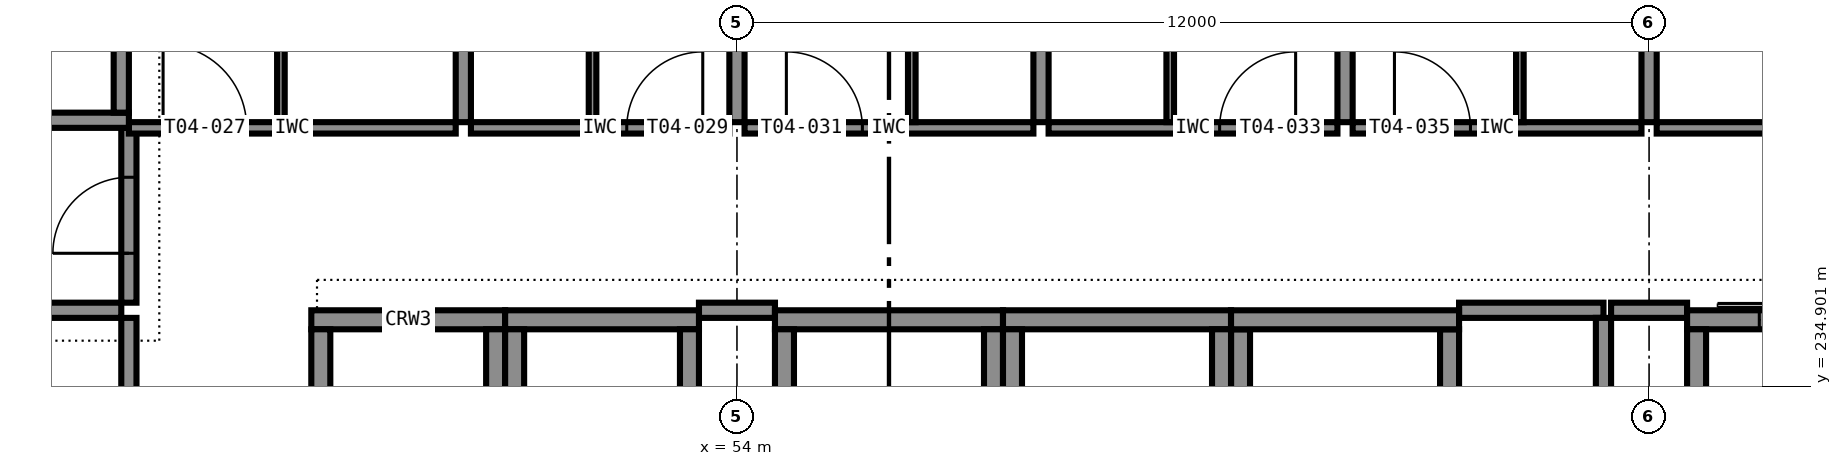
"""IFC4 building model, lengths in metres.
Left out: names, types, materials, properties, quantities, classifications, styles, units other than length and angle.
Written with IfcOpenShell. Run it as: python <this file> out.ifc"""

import sys

from ifc_helpers import new_model, si_unit, direction, frame, frame_2d, origin, place, context, subcontext, project, spatial, rectangle, extrude, element, fill, save


model = new_model("IFC4")
c1 = context("Model", 3, precision=1e-05, world=origin(), true_north=direction((0.0, 1.0)))
c2 = subcontext(c1, "Body", "Model", "MODEL_VIEW")
j1 = project(units=[si_unit("LENGTHUNIT", "METRE"), si_unit("PLANEANGLEUNIT", "RADIAN")], contexts=[c1])
p1 = place(None, origin())
s1 = spatial("IfcSite", under=j1, at=p1, CompositionType="ELEMENT")
p2 = place(p1, origin())
s2 = spatial("IfcBuilding", under=s1, at=p2, CompositionType="ELEMENT")
p3 = place(p2, frame((0.0, 0.0, 21.0)))
s3 = spatial("IfcBuildingStorey", under=s2, at=p3, CompositionType="ELEMENT", Elevation=21.0)
p4 = place(p3, frame((54.5, 235.775, 0.0), z_axis=(0.0, 0.0, 1.0), x_axis=(1.0, 0.0, 0.0)))
e1 = element("IfcWall", 1, at=p4, inside=s3, PredefinedType="SHEAR", context=c2, shape_type="SweptSolid", body=[
    extrude(rectangle(XDim=3.0, YDim=0.25, at=frame_2d((1.5, 0.0))), origin(), (0.0, 0.0, 1.0), 3.6),
])
for number, where, z_axis, x_axis in (
    (2, (54.625, 232.35, 0.0), (0.0, 0.0, 1.0), (0.0, 1.0, 0.0)),
    (3, (57.375, 232.35, 0.0), (0.0, 0.0, 1.0), (0.0, 1.0, 0.0)),
):
    element("IfcWall", number, at=place(p3, frame(where, z_axis=z_axis, x_axis=x_axis)), inside=s3, PredefinedType="SHEAR", context=c2, shape_type="SweptSolid", body=[
        extrude(rectangle(XDim=3.3, YDim=0.25, at=frame_2d((1.65, 0.0))), origin(), (0.0, 0.0, 1.0), 3.6),
    ])
p5 = place(p3, frame((57.5, 235.775, 0.0), z_axis=(0.0, 0.0, 1.0), x_axis=(1.0, 0.0, 0.0)))
e4 = element("IfcWall", 4, at=p5, inside=s3, PredefinedType="SHEAR", context=c2, shape_type="SweptSolid", body=[
    extrude(rectangle(XDim=3.0, YDim=0.25, at=frame_2d((1.5, 0.0))), origin(), (0.0, 0.0, 1.0), 3.6),
])
for number, where, z_axis, x_axis in (
    (5, (57.625, 232.35, 0.0), (0.0, 0.0, 1.0), (0.0, 1.0, 0.0)),
    (6, (60.375, 232.35, 0.0), (0.0, 0.0, 1.0), (0.0, 1.0, 0.0)),
):
    element("IfcWall", number, at=place(p3, frame(where, z_axis=z_axis, x_axis=x_axis)), inside=s3, PredefinedType="SHEAR", context=c2, shape_type="SweptSolid", body=[
        extrude(rectangle(XDim=3.3, YDim=0.25, at=frame_2d((1.65, 0.0))), origin(), (0.0, 0.0, 1.0), 3.6),
    ])
p6 = place(p3, frame((60.5, 235.775, 0.0), z_axis=(0.0, 0.0, 1.0), x_axis=(1.0, 0.0, 0.0)))
e7 = element("IfcWall", 7, at=p6, inside=s3, PredefinedType="SHEAR", context=c2, shape_type="SweptSolid", body=[
    extrude(rectangle(XDim=3.0, YDim=0.25, at=frame_2d((1.5, 0.0))), origin(), (0.0, 0.0, 1.0), 3.6),
])
for number, where, z_axis, x_axis in (
    (8, (60.625, 232.35, 0.0), (0.0, 0.0, 1.0), (0.0, 1.0, 0.0)),
    (9, (63.375, 232.35, 0.0), (0.0, 0.0, 1.0), (0.0, 1.0, 0.0)),
):
    element("IfcWall", number, at=place(p3, frame(where, z_axis=z_axis, x_axis=x_axis)), inside=s3, PredefinedType="SHEAR", context=c2, shape_type="SweptSolid", body=[
        extrude(rectangle(XDim=3.3, YDim=0.25, at=frame_2d((1.65, 0.0))), origin(), (0.0, 0.0, 1.0), 3.6),
    ])
p7 = place(p3, frame((66.5, 235.775, 0.0), z_axis=(0.0, 0.0, 1.0), x_axis=(1.0, 0.0, 0.0)))
e10 = element("IfcWall", 10, at=p7, inside=s3, PredefinedType="SHEAR", context=c2, shape_type="SweptSolid", body=[
    extrude(rectangle(XDim=3.0, YDim=0.25, at=frame_2d((1.5, 0.0))), origin(), (0.0, 0.0, 1.0), 3.6),
])
p8 = place(p7, frame((0.95, 0.0, 0.0)))
e11 = element("IfcOpeningElement", 11, at=p8, cuts=e10, PredefinedType="OPENING", context=c2, shape_type="SweptSolid", body=[
    extrude(rectangle(XDim=1.1, YDim=2.1, at=frame_2d((0.55, 1.05))), frame((0.0, 0.135, 0.0), z_axis=(0.0, -1.0, 0.0), x_axis=(1.0, 0.0, 0.0)), (0.0, 0.0, 1.0), 0.27),
])
p9 = place(p3, frame((66.625, 232.35, 0.0), z_axis=(0.0, 0.0, 1.0), x_axis=(0.0, 1.0, 0.0)))
e12 = element("IfcWall", 12, at=p9, inside=s3, PredefinedType="SHEAR", context=c2, shape_type="SweptSolid", body=[
    extrude(rectangle(XDim=3.3, YDim=0.25, at=frame_2d((1.65, 0.0))), origin(), (0.0, 0.0, 1.0), 3.6),
])
p10 = place(p3, frame((48.4, 235.775, 0.0), z_axis=(0.0, 0.0, 1.0), x_axis=(1.0, 0.0, 0.0)))
e13 = element("IfcWall", 13, at=p10, inside=s3, PredefinedType="SHEAR", context=c2, shape_type="SweptSolid", body=[
    extrude(rectangle(XDim=2.55, YDim=0.25, at=frame_2d((1.275, 0.0))), origin(), (0.0, 0.0, 1.0), 3.6),
])
for number, where, z_axis, x_axis in (
    (14, (48.525, 232.35, 0.0), (0.0, 0.0, 1.0), (0.0, 1.0, 0.0)),
    (15, (50.825, 232.35, 0.0), (0.0, 0.0, 1.0), (0.0, 1.0, 0.0)),
):
    element("IfcWall", number, at=place(p3, frame(where, z_axis=z_axis, x_axis=x_axis)), inside=s3, PredefinedType="SHEAR", context=c2, shape_type="SweptSolid", body=[
        extrude(rectangle(XDim=3.3, YDim=0.25, at=frame_2d((1.65, 0.0))), origin(), (0.0, 0.0, 1.0), 3.6),
    ])
p11 = place(p3, frame((50.95, 235.775, 0.0), z_axis=(0.0, 0.0, 1.0), x_axis=(1.0, 0.0, 0.0)))
e16 = element("IfcWall", 16, at=p11, inside=s3, PredefinedType="SHEAR", context=c2, shape_type="SweptSolid", body=[
    extrude(rectangle(XDim=2.55, YDim=0.25, at=frame_2d((1.275, 0.0))), origin(), (0.0, 0.0, 1.0), 3.6),
])
for number, where, z_axis, x_axis in (
    (17, (51.075, 232.35, 0.0), (0.0, 0.0, 1.0), (0.0, 1.0, 0.0)),
    (18, (53.375, 232.35, 0.0), (0.0, 0.0, 1.0), (0.0, 1.0, 0.0)),
):
    element("IfcWall", number, at=place(p3, frame(where, z_axis=z_axis, x_axis=x_axis)), inside=s3, PredefinedType="SHEAR", context=c2, shape_type="SweptSolid", body=[
        extrude(rectangle(XDim=3.3, YDim=0.25, at=frame_2d((1.65, 0.0))), origin(), (0.0, 0.0, 1.0), 3.6),
    ])
p12 = place(p3, frame((42.5, 238.4, 0.0), z_axis=(0.0, 0.0, 1.0), x_axis=(1.0, 0.0, 0.0)))
e19 = element("IfcWall", 19, at=p12, inside=s3, PredefinedType="SHEAR", context=c2, shape_type="SweptSolid", body=[
    extrude(rectangle(XDim=3.5, YDim=0.2, at=frame_2d((1.75, 0.0))), origin(), (0.0, 0.0, 1.0), 3.6),
])
p13 = place(p12, frame((1.15, 0.0, 0.0)))
e20 = element("IfcOpeningElement", 20, at=p13, cuts=e19, PredefinedType="OPENING", context=c2, shape_type="SweptSolid", body=[
    extrude(rectangle(XDim=1.2, YDim=2.1, at=frame_2d((0.6, 1.05))), frame((0.0, 0.11, 0.0), z_axis=(0.0, -1.0, 0.0), x_axis=(1.0, 0.0, 0.0)), (0.0, 0.0, 1.0), 0.22),
])
p14 = place(p3, frame((45.9, 238.5, 0.0), z_axis=(0.0, 0.0, 1.0), x_axis=(0.0, 1.0, 0.0)))
e21 = element("IfcWall", 21, at=p14, inside=s3, PredefinedType="SHEAR", context=c2, shape_type="SweptSolid", body=[
    extrude(rectangle(XDim=7.0, YDim=0.2, at=frame_2d((3.5, 0.0))), origin(), (0.0, 0.0, 1.0), 3.6),
])
p15 = place(p3, frame((42.3, 235.9, 0.0), z_axis=(0.0, 0.0, 1.0), x_axis=(1.0, 0.0, 0.0)))
e22 = element("IfcWall", 22, at=p15, inside=s3, PredefinedType="PARTITIONING", context=c2, shape_type="SweptSolid", body=[
    extrude(rectangle(XDim=3.6, YDim=0.2, at=frame_2d((1.8, 0.0))), origin(), (0.0, 0.0, 1.0), 3.4),
])
p16 = place(p3, frame((53.5, 235.9, 0.0), z_axis=(0.0, 0.0, 1.0), x_axis=(1.0, 0.0, 0.0)))
e23 = element("IfcWall", 23, at=p16, inside=s3, PredefinedType="PARTITIONING", context=c2, shape_type="SweptSolid", body=[
    extrude(rectangle(XDim=1.0, YDim=0.2, at=frame_2d((0.5, 0.0))), origin(), (0.0, 0.0, 1.0), 3.4),
])
p17 = place(p3, frame((63.5, 235.9, 0.0), z_axis=(0.0, 0.0, 1.0), x_axis=(1.0, 0.0, 0.0)))
e24 = element("IfcWall", 24, at=p17, inside=s3, PredefinedType="PARTITIONING", context=c2, shape_type="SweptSolid", body=[
    extrude(rectangle(XDim=1.9, YDim=0.2, at=frame_2d((0.95, 0.0))), origin(), (0.0, 0.0, 1.0), 3.4),
])
p18 = place(p3, frame((65.5, 235.9, 0.0), z_axis=(0.0, 0.0, 1.0), x_axis=(1.0, 0.0, 0.0)))
e25 = element("IfcWall", 25, at=p18, inside=s3, PredefinedType="PARTITIONING", context=c2, shape_type="SweptSolid", body=[
    extrude(rectangle(XDim=1.0, YDim=0.2, at=frame_2d((0.5, 0.0))), origin(), (0.0, 0.0, 1.0), 3.4),
])
p19 = place(p3, frame((46.0, 232.2, 0.0), z_axis=(0.0, 0.0, 1.0), x_axis=(0.0, 1.0, 0.0)))
e26 = element("IfcWall", 26, at=p19, inside=s3, PredefinedType="PARTITIONING", context=c2, shape_type="SweptSolid", body=[
    extrude(rectangle(XDim=3.6, YDim=0.2, at=frame_2d((1.8, 0.0))), origin(), (0.0, 0.0, 1.0), 3.4),
])
p20 = place(p19, frame((1.35, 0.0, 0.0)))
e27 = element("IfcOpeningElement", 27, at=p20, cuts=e26, PredefinedType="OPENING", context=c2, shape_type="SweptSolid", body=[
    extrude(rectangle(XDim=0.9, YDim=2.1, at=frame_2d((0.45, 1.05))), frame((0.0, 0.11, 0.0), z_axis=(0.0, -1.0, 0.0), x_axis=(1.0, 0.0, 0.0)), (0.0, 0.0, 1.0), 0.22),
])
p21 = place(p3, frame((46.0, 236.0, 0.0), z_axis=(0.0, 0.0, 1.0), x_axis=(0.0, 1.0, 0.0)))
e28 = element("IfcWall", 28, at=p21, inside=s3, PredefinedType="PARTITIONING", context=c2, shape_type="SweptSolid", body=[
    extrude(rectangle(XDim=2.3, YDim=0.2, at=frame_2d((1.15, 0.0))), origin(), (0.0, 0.0, 1.0), 3.4),
])
p22 = place(p21, frame((0.65, 0.0, 0.0)))
e29 = element("IfcOpeningElement", 29, at=p22, cuts=e28, PredefinedType="OPENING", context=c2, shape_type="SweptSolid", body=[
    extrude(rectangle(XDim=1.0, YDim=2.1, at=frame_2d((0.5, 1.05))), frame((0.0, 0.11, 0.0), z_axis=(0.0, -1.0, 0.0), x_axis=(1.0, 0.0, 0.0)), (0.0, 0.0, 1.0), 0.22),
])
p23 = place(p3, frame((65.4, 232.2, 0.0), z_axis=(0.0, 0.0, 1.0), x_axis=(0.0, 1.0, 0.0)))
e30 = element("IfcWall", 30, at=p23, inside=s3, PredefinedType="PARTITIONING", context=c2, shape_type="SweptSolid", body=[
    extrude(rectangle(XDim=3.6, YDim=0.2, at=frame_2d((1.8, 0.0))), origin(), (0.0, 0.0, 1.0), 3.4),
])
p24 = place(p3, frame((46.0, 238.3, 0.0), z_axis=(0.0, 0.0, 1.0), x_axis=(1.0, 0.0, 0.0)))
e31 = element("IfcWall", 31, at=p24, inside=s3, PredefinedType="PARTITIONING", context=c2, shape_type="SweptSolid", body=[
    extrude(rectangle(XDim=4.3, YDim=0.15, at=frame_2d((2.15, 0.0))), origin(), (0.0, 0.0, 1.0), 3.4),
])
p25 = place(p24, frame((0.45, 0.0, 0.0)))
e32 = element("IfcOpeningElement", 32, at=p25, cuts=e31, PredefinedType="OPENING", context=c2, shape_type="SweptSolid", body=[
    extrude(rectangle(XDim=1.1, YDim=2.1, at=frame_2d((0.55, 1.05))), frame((0.0, 0.085, 0.0), z_axis=(0.0, -1.0, 0.0), x_axis=(1.0, 0.0, 0.0)), (0.0, 0.0, 1.0), 0.17),
])
p26 = place(p3, frame((48.0, 238.375, 0.0), z_axis=(0.0, 0.0, 1.0), x_axis=(0.0, 1.0, 0.0)))
e33 = element("IfcWall", 33, at=p26, inside=s3, PredefinedType="PARTITIONING", context=c2, shape_type="SweptSolid", body=[
    extrude(rectangle(XDim=2.875, YDim=0.1, at=frame_2d((1.438, 0.0))), origin(), (0.0, 0.0, 1.0), 3.4),
])
p27 = place(p26, frame((0.988, 0.0, 0.0)))
e34 = element("IfcOpeningElement", 34, at=p27, cuts=e33, PredefinedType="OPENING", context=c2, shape_type="SweptSolid", body=[
    extrude(rectangle(XDim=0.9, YDim=2.1, at=frame_2d((0.45, 1.05))), frame((0.0, 0.06, 0.0), z_axis=(0.0, -1.0, 0.0), x_axis=(1.0, 0.0, 0.0)), (0.0, 0.0, 1.0), 0.12),
])
p28 = place(p3, frame((50.5, 238.3, 0.0), z_axis=(0.0, 0.0, 1.0), x_axis=(1.0, 0.0, 0.0)))
e35 = element("IfcWall", 35, at=p28, inside=s3, PredefinedType="PARTITIONING", context=c2, shape_type="SweptSolid", body=[
    extrude(rectangle(XDim=3.4, YDim=0.15, at=frame_2d((1.7, 0.0))), origin(), (0.0, 0.0, 1.0), 3.4),
])
p29 = place(p28, frame((2.05, 0.0, 0.0)))
e36 = element("IfcOpeningElement", 36, at=p29, cuts=e35, PredefinedType="OPENING", context=c2, shape_type="SweptSolid", body=[
    extrude(rectangle(XDim=1.0, YDim=2.1, at=frame_2d((0.5, 1.05))), frame((0.0, 0.085, 0.0), z_axis=(0.0, -1.0, 0.0), x_axis=(1.0, 0.0, 0.0)), (0.0, 0.0, 1.0), 0.17),
])
p30 = place(p3, frame((52.1, 241.25, 0.0), z_axis=(0.0, 0.0, 1.0), x_axis=(0.0, -1.0, 0.0)))
e37 = element("IfcWall", 37, at=p30, inside=s3, PredefinedType="PARTITIONING", context=c2, shape_type="SweptSolid", body=[
    extrude(rectangle(XDim=2.875, YDim=0.1, at=frame_2d((1.438, 0.0))), origin(), (0.0, 0.0, 1.0), 3.4),
])
p31 = place(p30, frame((1.038, 0.0, 0.0)))
e38 = element("IfcOpeningElement", 38, at=p31, cuts=e37, PredefinedType="OPENING", context=c2, shape_type="SweptSolid", body=[
    extrude(rectangle(XDim=0.8, YDim=2.1, at=frame_2d((0.4, 1.05))), frame((0.0, 0.06, 0.0), z_axis=(0.0, -1.0, 0.0), x_axis=(1.0, 0.0, 0.0)), (0.0, 0.0, 1.0), 0.12),
])
p32 = place(p3, frame((54.1, 238.3, 0.0), z_axis=(0.0, 0.0, 1.0), x_axis=(1.0, 0.0, 0.0)))
e39 = element("IfcWall", 39, at=p32, inside=s3, PredefinedType="PARTITIONING", context=c2, shape_type="SweptSolid", body=[
    extrude(rectangle(XDim=3.8, YDim=0.15, at=frame_2d((1.9, 0.0))), origin(), (0.0, 0.0, 1.0), 3.4),
])
p33 = place(p32, frame((0.55, 0.0, 0.0)))
e40 = element("IfcOpeningElement", 40, at=p33, cuts=e39, PredefinedType="OPENING", context=c2, shape_type="SweptSolid", body=[
    extrude(rectangle(XDim=1.0, YDim=2.1, at=frame_2d((0.5, 1.05))), frame((0.0, 0.085, 0.0), z_axis=(0.0, -1.0, 0.0), x_axis=(1.0, 0.0, 0.0)), (0.0, 0.0, 1.0), 0.17),
])
p34 = place(p3, frame((56.3, 238.375, 0.0), z_axis=(0.0, 0.0, 1.0), x_axis=(0.0, 1.0, 0.0)))
e41 = element("IfcWall", 41, at=p34, inside=s3, PredefinedType="PARTITIONING", context=c2, shape_type="SweptSolid", body=[
    extrude(rectangle(XDim=2.875, YDim=0.1, at=frame_2d((1.438, 0.0))), origin(), (0.0, 0.0, 1.0), 3.4),
])
p35 = place(p34, frame((1.038, 0.0, 0.0)))
e42 = element("IfcOpeningElement", 42, at=p35, cuts=e41, PredefinedType="OPENING", context=c2, shape_type="SweptSolid", body=[
    extrude(rectangle(XDim=0.8, YDim=2.1, at=frame_2d((0.4, 1.05))), frame((0.0, 0.06, 0.0), z_axis=(0.0, -1.0, 0.0), x_axis=(1.0, 0.0, 0.0)), (0.0, 0.0, 1.0), 0.12),
])
p36 = place(p3, frame((58.1, 238.3, 0.0), z_axis=(0.0, 0.0, 1.0), x_axis=(1.0, 0.0, 0.0)))
e43 = element("IfcWall", 43, at=p36, inside=s3, PredefinedType="PARTITIONING", context=c2, shape_type="SweptSolid", body=[
    extrude(rectangle(XDim=3.8, YDim=0.15, at=frame_2d((1.9, 0.0))), origin(), (0.0, 0.0, 1.0), 3.4),
])
p37 = place(p36, frame((2.25, 0.0, 0.0)))
e44 = element("IfcOpeningElement", 44, at=p37, cuts=e43, PredefinedType="OPENING", context=c2, shape_type="SweptSolid", body=[
    extrude(rectangle(XDim=1.0, YDim=2.1, at=frame_2d((0.5, 1.05))), frame((0.0, 0.085, 0.0), z_axis=(0.0, -1.0, 0.0), x_axis=(1.0, 0.0, 0.0)), (0.0, 0.0, 1.0), 0.17),
])
p38 = place(p3, frame((59.7, 241.25, 0.0), z_axis=(0.0, 0.0, 1.0), x_axis=(0.0, -1.0, 0.0)))
e45 = element("IfcWall", 45, at=p38, inside=s3, PredefinedType="PARTITIONING", context=c2, shape_type="SweptSolid", body=[
    extrude(rectangle(XDim=2.875, YDim=0.1, at=frame_2d((1.438, 0.0))), origin(), (0.0, 0.0, 1.0), 3.4),
])
p39 = place(p38, frame((1.038, 0.0, 0.0)))
e46 = element("IfcOpeningElement", 46, at=p39, cuts=e45, PredefinedType="OPENING", context=c2, shape_type="SweptSolid", body=[
    extrude(rectangle(XDim=0.8, YDim=2.1, at=frame_2d((0.4, 1.05))), frame((0.0, 0.06, 0.0), z_axis=(0.0, -1.0, 0.0), x_axis=(1.0, 0.0, 0.0)), (0.0, 0.0, 1.0), 0.12),
])
p40 = place(p3, frame((62.1, 238.3, 0.0), z_axis=(0.0, 0.0, 1.0), x_axis=(1.0, 0.0, 0.0)))
e47 = element("IfcWall", 47, at=p40, inside=s3, PredefinedType="PARTITIONING", context=c2, shape_type="SweptSolid", body=[
    extrude(rectangle(XDim=3.8, YDim=0.15, at=frame_2d((1.9, 0.0))), origin(), (0.0, 0.0, 1.0), 3.4),
])
p41 = place(p40, frame((0.55, 0.0, 0.0)))
e48 = element("IfcOpeningElement", 48, at=p41, cuts=e47, PredefinedType="OPENING", context=c2, shape_type="SweptSolid", body=[
    extrude(rectangle(XDim=1.0, YDim=2.1, at=frame_2d((0.5, 1.05))), frame((0.0, 0.085, 0.0), z_axis=(0.0, -1.0, 0.0), x_axis=(1.0, 0.0, 0.0)), (0.0, 0.0, 1.0), 0.17),
])
p42 = place(p3, frame((64.3, 238.375, 0.0), z_axis=(0.0, 0.0, 1.0), x_axis=(0.0, 1.0, 0.0)))
e49 = element("IfcWall", 49, at=p42, inside=s3, PredefinedType="PARTITIONING", context=c2, shape_type="SweptSolid", body=[
    extrude(rectangle(XDim=2.875, YDim=0.1, at=frame_2d((1.438, 0.0))), origin(), (0.0, 0.0, 1.0), 3.4),
])
p43 = place(p42, frame((1.038, 0.0, 0.0)))
e50 = element("IfcOpeningElement", 50, at=p43, cuts=e49, PredefinedType="OPENING", context=c2, shape_type="SweptSolid", body=[
    extrude(rectangle(XDim=0.8, YDim=2.1, at=frame_2d((0.4, 1.05))), frame((0.0, 0.06, 0.0), z_axis=(0.0, -1.0, 0.0), x_axis=(1.0, 0.0, 0.0)), (0.0, 0.0, 1.0), 0.12),
])
p44 = place(p3, frame((66.1, 238.3, 0.0), z_axis=(0.0, 0.0, 1.0), x_axis=(1.0, 0.0, 0.0)))
e51 = element("IfcWall", 51, at=p44, inside=s3, PredefinedType="PARTITIONING", context=c2, shape_type="SweptSolid", body=[
    extrude(rectangle(XDim=3.8, YDim=0.15, at=frame_2d((1.9, 0.0))), origin(), (0.0, 0.0, 1.0), 3.4),
])
p45 = place(p44, frame((2.25, 0.0, 0.0)))
e52 = element("IfcOpeningElement", 52, at=p45, cuts=e51, PredefinedType="OPENING", context=c2, shape_type="SweptSolid", body=[
    extrude(rectangle(XDim=1.0, YDim=2.1, at=frame_2d((0.5, 1.05))), frame((0.0, 0.085, 0.0), z_axis=(0.0, -1.0, 0.0), x_axis=(1.0, 0.0, 0.0)), (0.0, 0.0, 1.0), 0.17),
])
p46 = place(p3, frame((50.4, 245.7, 0.0), z_axis=(0.0, 0.0, 1.0), x_axis=(0.0, -1.0, 0.0)))
e53 = element("IfcWall", 53, at=p46, inside=s3, PredefinedType="PARTITIONING", context=c2, shape_type="SweptSolid", body=[
    extrude(rectangle(XDim=7.325, YDim=0.2, at=frame_2d((3.663, 0.0))), origin(), (0.0, 0.0, 1.0), 3.4),
])
p47 = place(p3, frame((54.0, 245.55, 0.0), z_axis=(0.0, 0.0, 1.0), x_axis=(0.0, -1.0, 0.0)))
e54 = element("IfcWall", 54, at=p47, inside=s3, PredefinedType="PARTITIONING", context=c2, shape_type="SweptSolid", body=[
    extrude(rectangle(XDim=7.175, YDim=0.2, at=frame_2d((3.587, 0.0))), origin(), (0.0, 0.0, 1.0), 2.6),
])
for number, where, z_axis, x_axis in (
    (55, (58.0, 245.7, 0.0), (0.0, 0.0, 1.0), (0.0, -1.0, 0.0)),
    (56, (62.0, 245.7, 0.0), (0.0, 0.0, 1.0), (0.0, -1.0, 0.0)),
):
    element("IfcWall", number, at=place(p3, frame(where, z_axis=z_axis, x_axis=x_axis)), inside=s3, PredefinedType="PARTITIONING", context=c2, shape_type="SweptSolid", body=[
        extrude(rectangle(XDim=7.325, YDim=0.2, at=frame_2d((3.663, 0.0))), origin(), (0.0, 0.0, 1.0), 3.4),
    ])
p48 = place(p3, frame((66.0, 245.55, 0.0), z_axis=(0.0, 0.0, 1.0), x_axis=(0.0, -1.0, 0.0)))
e57 = element("IfcWall", 57, at=p48, inside=s3, PredefinedType="PARTITIONING", context=c2, shape_type="SweptSolid", body=[
    extrude(rectangle(XDim=7.175, YDim=0.2, at=frame_2d((3.587, 0.0))), origin(), (0.0, 0.0, 1.0), 2.6),
])
p49 = place(p22, origin())
e58 = element("IfcDoor", 58, at=p49, inside=s3, OperationType="SINGLE_SWING_LEFT", PredefinedType="DOOR", context=c2, shape_type="SweptSolid", body=[
    extrude(rectangle(XDim=1.0, YDim=2.1, at=frame_2d((0.5, 1.05))), frame((0.0, 0.025, 0.0), z_axis=(0.0, -1.0, 0.0), x_axis=(1.0, 0.0, 0.0)), (0.0, 0.0, 1.0), 0.05),
])
fill(e29, e58)
p50 = place(p25, origin())
e59 = element("IfcDoor", 59, at=p50, inside=s3, OperationType="SINGLE_SWING_LEFT", PredefinedType="DOOR", context=c2, shape_type="SweptSolid", body=[
    extrude(rectangle(XDim=1.1, YDim=2.1, at=frame_2d((0.55, 1.05))), frame((0.0, 0.025, 0.0), z_axis=(0.0, -1.0, 0.0), x_axis=(1.0, 0.0, 0.0)), (0.0, 0.0, 1.0), 0.05),
])
fill(e32, e59)
p51 = place(p29, origin())
e60 = element("IfcDoor", 60, at=p51, inside=s3, OperationType="SINGLE_SWING_RIGHT", PredefinedType="DOOR", context=c2, shape_type="SweptSolid", body=[
    extrude(rectangle(XDim=1.0, YDim=2.1, at=frame_2d((0.5, 1.05))), frame((0.0, 0.025, 0.0), z_axis=(0.0, -1.0, 0.0), x_axis=(1.0, 0.0, 0.0)), (0.0, 0.0, 1.0), 0.05),
])
fill(e36, e60)
p52 = place(p33, origin())
e61 = element("IfcDoor", 61, at=p52, inside=s3, OperationType="SINGLE_SWING_LEFT", PredefinedType="DOOR", context=c2, shape_type="SweptSolid", body=[
    extrude(rectangle(XDim=1.0, YDim=2.1, at=frame_2d((0.5, 1.05))), frame((0.0, 0.025, 0.0), z_axis=(0.0, -1.0, 0.0), x_axis=(1.0, 0.0, 0.0)), (0.0, 0.0, 1.0), 0.05),
])
fill(e40, e61)
p53 = place(p37, origin())
e62 = element("IfcDoor", 62, at=p53, inside=s3, OperationType="SINGLE_SWING_RIGHT", PredefinedType="DOOR", context=c2, shape_type="SweptSolid", body=[
    extrude(rectangle(XDim=1.0, YDim=2.1, at=frame_2d((0.5, 1.05))), frame((0.0, 0.025, 0.0), z_axis=(0.0, -1.0, 0.0), x_axis=(1.0, 0.0, 0.0)), (0.0, 0.0, 1.0), 0.05),
])
fill(e44, e62)
p54 = place(p41, origin())
e63 = element("IfcDoor", 63, at=p54, inside=s3, OperationType="SINGLE_SWING_LEFT", PredefinedType="DOOR", context=c2, shape_type="SweptSolid", body=[
    extrude(rectangle(XDim=1.0, YDim=2.1, at=frame_2d((0.5, 1.05))), frame((0.0, 0.025, 0.0), z_axis=(0.0, -1.0, 0.0), x_axis=(1.0, 0.0, 0.0)), (0.0, 0.0, 1.0), 0.05),
])
fill(e48, e63)
p55 = place(p8, origin())
e64 = element("IfcDoor", 64, at=p55, inside=s3, OperationType="SLIDING_TO_LEFT", PredefinedType="DOOR", context=c2, shape_type="SweptSolid", body=[
    extrude(rectangle(XDim=1.1, YDim=2.1, at=frame_2d((0.55, 1.05))), frame((0.0, 0.025, 0.0), z_axis=(0.0, -1.0, 0.0), x_axis=(1.0, 0.0, 0.0)), (0.0, 0.0, 1.0), 0.05),
])
fill(e11, e64)
save(model, sys.argv[1])
